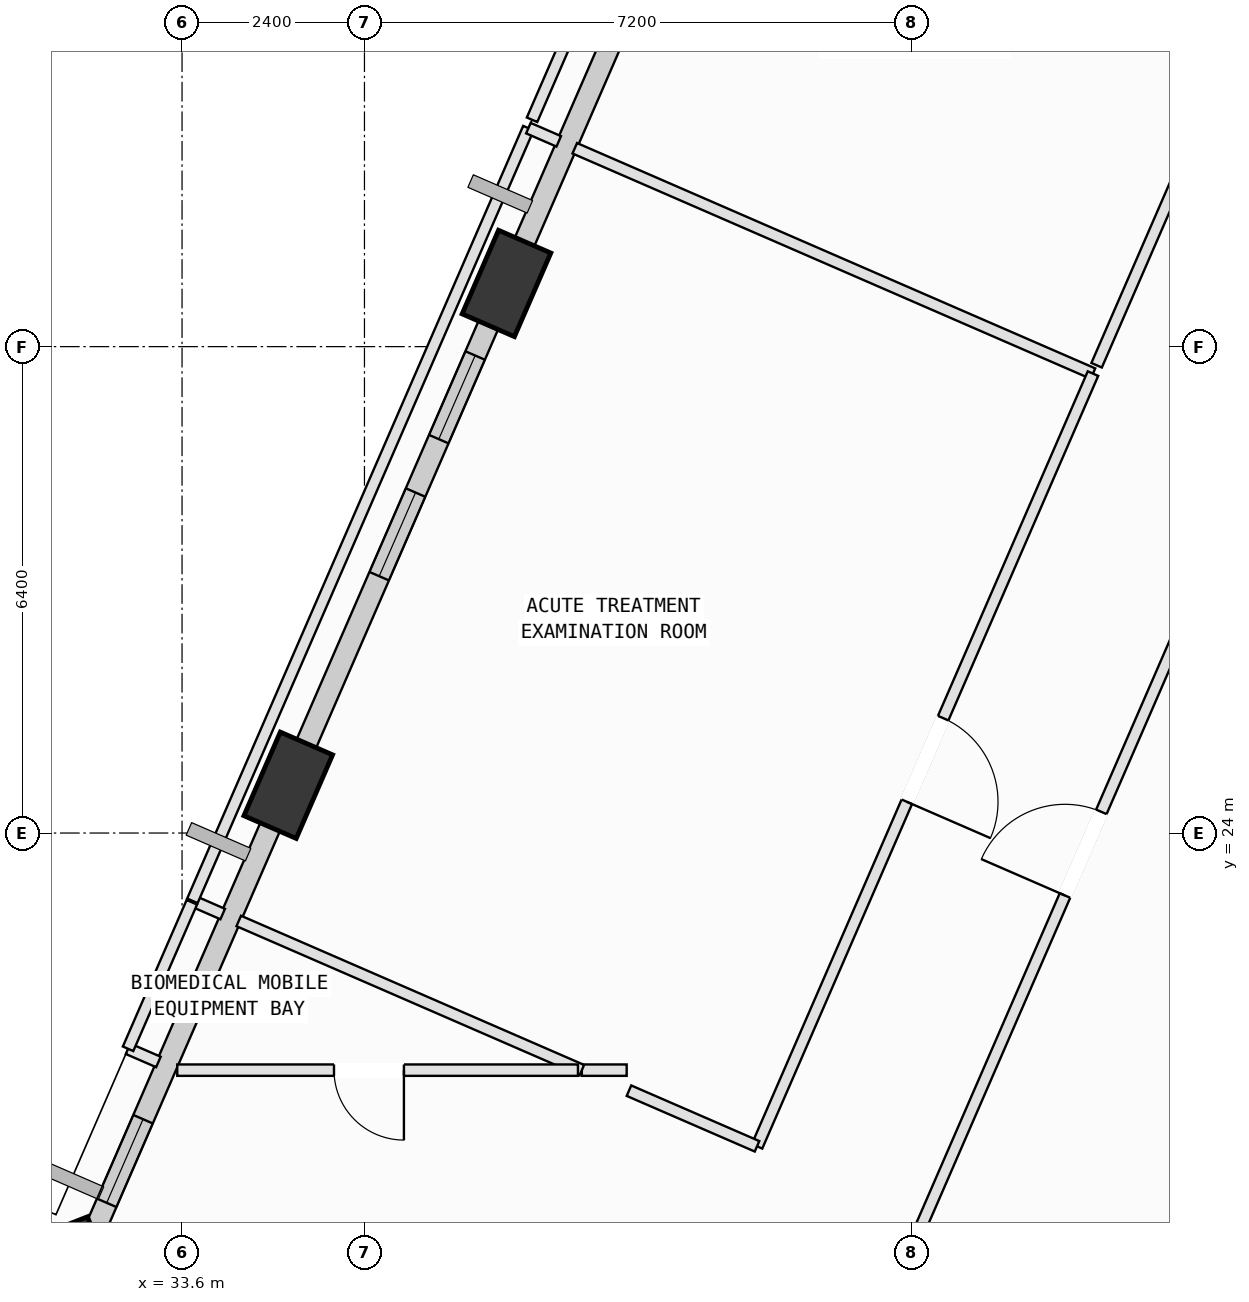
"""IFC4 building model, lengths in metres.
Left out: names, types, materials, properties, quantities, classifications, styles, units other than length and angle.
Written with IfcOpenShell. Run it as: python <this file> out.ifc"""

import sys

from ifc_helpers import new_model, si_unit, direction, frame, frame_2d, origin, origin_2d, place, context, subcontext, project, spatial, rectangle, extrude, element, fill, save


model = new_model("IFC4")
c1 = context("Model", 3, precision=1e-05, world=origin(), true_north=direction((0.0, 1.0)))
c2 = subcontext(c1, "Body", "Model", "MODEL_VIEW")
j1 = project(units=[si_unit("LENGTHUNIT", "METRE"), si_unit("PLANEANGLEUNIT", "RADIAN")], contexts=[c1])
p1 = place(None, origin())
s1 = spatial("IfcSite", under=j1, at=p1, CompositionType="ELEMENT")
p2 = place(p1, origin())
s2 = spatial("IfcBuilding", under=s1, at=p2, CompositionType="ELEMENT")
p3 = place(p2, frame((0.0, 0.0, 308.6)))
s3 = spatial("IfcBuildingStorey", under=s2, at=p3, CompositionType="ELEMENT", Elevation=308.6)
for number, where, z_axis, x_axis in (
    (1, (37.868, 31.231, 0.002), (0.0, 0.0, 1.0), (0.399, 0.917, 0.0)),
    (2, (34.998, 24.628, 0.002), (0.0, 0.0, 1.0), (0.399, 0.917, 0.0)),
    (3, (32.226, 18.255, 0.002), (0.0, 0.0, 1.0), (-0.367, 0.93, 0.0)),
):
    element("IfcColumn", number, at=place(p3, frame(where, z_axis=z_axis, x_axis=x_axis)), inside=s3, PredefinedType="COLUMN", context=c2, shape_type="SweptSolid", body=[
        extrude(rectangle(XDim=1.2, YDim=0.75, at=origin_2d()), origin(), (0.0, 0.0, 1.0), 3.996),
    ])
p4 = place(p3, frame((38.027, 31.596, 0.0), z_axis=(0.0, 0.0, 1.0), x_axis=(0.398764437463, 0.917053391802, 0.0)))
e4 = element("IfcWall", 4, at=p4, inside=s3, PredefinedType="SOLIDWALL", context=c2, shape_type="SweptSolid", body=[
    extrude(rectangle(XDim=6.755, YDim=0.28, at=frame_2d((3.377, 0.0))), origin(), (0.0, 0.0, 1.0), 3.265),
])
p5 = place(p4, frame((3.438, 0.0, 0.75)))
e5 = element("IfcOpeningElement", 5, at=p5, cuts=e4, PredefinedType="OPENING", context=c2, shape_type="SweptSolid", body=[
    extrude(rectangle(XDim=1.8, YDim=2.05, at=frame_2d((0.9, 1.025))), frame((0.0, 0.15, 0.0), z_axis=(0.0, -1.0, 0.0), x_axis=(1.0, 0.0, 0.0)), (0.0, 0.0, 1.0), 0.3),
])
p6 = place(p3, frame((35.156, 24.993, 0.0), z_axis=(0.0, 0.0, 1.0), x_axis=(0.398758169539, 0.917056117272, 0.0)))
e6 = element("IfcWall", 6, at=p6, inside=s3, PredefinedType="SOLIDWALL", context=c2, shape_type="SweptSolid", body=[
    extrude(rectangle(XDim=6.405, YDim=0.28, at=frame_2d((3.202, 0.0))), origin(), (0.0, 0.0, 1.0), 3.265),
])
p7 = place(p6, frame((2.602, 0.0, 0.75)))
e7 = element("IfcOpeningElement", 7, at=p7, cuts=e6, PredefinedType="OPENING", context=c2, shape_type="SweptSolid", body=[
    extrude(rectangle(XDim=1.2, YDim=1.75, at=frame_2d((0.6, 0.875))), frame((0.0, 0.15, 0.0), z_axis=(0.0, -1.0, 0.0), x_axis=(1.0, 0.0, 0.0)), (0.0, 0.0, 1.0), 0.3),
])
p8 = place(p6, frame((4.569, 0.0, 0.75)))
e8 = element("IfcOpeningElement", 8, at=p8, cuts=e6, PredefinedType="OPENING", context=c2, shape_type="SweptSolid", body=[
    extrude(rectangle(XDim=1.2, YDim=1.75, at=frame_2d((0.6, 0.875))), frame((0.0, 0.15, 0.0), z_axis=(0.0, -1.0, 0.0), x_axis=(1.0, 0.0, 0.0)), (0.0, 0.0, 1.0), 0.3),
])
p9 = place(p3, frame((32.385, 18.619, 0.0), z_axis=(0.0, 0.0, 1.0), x_axis=(0.398753668733, 0.917058074318, 0.0)))
e9 = element("IfcWall", 9, at=p9, inside=s3, PredefinedType="SOLIDWALL", context=c2, shape_type="SweptSolid", body=[
    extrude(rectangle(XDim=6.155, YDim=0.28, at=frame_2d((3.078, 0.0))), origin(), (0.0, 0.0, 1.0), 3.265),
])
p10 = place(p9, frame((0.561, 0.0, 0.75)))
e10 = element("IfcOpeningElement", 10, at=p10, cuts=e9, PredefinedType="OPENING", context=c2, shape_type="SweptSolid", body=[
    extrude(rectangle(XDim=1.2, YDim=1.75, at=frame_2d((0.6, 0.875))), frame((0.0, 0.15, 0.0), z_axis=(0.0, -1.0, 0.0), x_axis=(1.0, 0.0, 0.0)), (0.0, 0.0, 1.0), 0.3),
])
p11 = place(p3, frame((25.484, 21.187, 0.0), z_axis=(0.0, 0.0, 1.0), x_axis=(0.917060568388, -0.398747932794, 0.0)))
e11 = element("IfcWall", 11, at=p11, inside=s3, PredefinedType="SOLIDWALL", context=c2, shape_type="SweptSolid", body=[
    extrude(rectangle(XDim=6.955, YDim=0.28, at=frame_2d((3.478, 0.0))), origin(), (0.0, 0.0, 1.0), 2.765),
])
p12 = place(p3, frame((42.856, 17.749, 0.0), z_axis=(0.0, 0.0, 1.0), x_axis=(0.398751440491, 0.917059043195, 0.0)))
e12 = element("IfcWall", 12, at=p12, inside=s3, PredefinedType="PARTITIONING", context=c2, shape_type="SweptSolid", body=[
    extrude(rectangle(XDim=13.041, YDim=0.15, at=frame_2d((6.52, 0.0))), origin(), (0.0, 0.0, 1.0), 3.78),
])
p13 = place(p12, frame((5.92, 0.0, 0.0)))
e13 = element("IfcOpeningElement", 13, at=p13, cuts=e12, PredefinedType="OPENING", context=c2, shape_type="SweptSolid", body=[
    extrude(rectangle(XDim=1.2, YDim=2.15, at=frame_2d((0.6, 1.075))), frame((0.0, 0.085, 0.0), z_axis=(0.0, -1.0, 0.0), x_axis=(1.0, 0.0, 0.0)), (0.0, 0.0, 1.0), 0.17),
])
p14 = place(p3, frame((39.45, 20.88, 0.0), z_axis=(0.0, 0.0, 1.0), x_axis=(-1.0, 0.0, 0.0)))
e14 = element("IfcWall", 14, at=p14, inside=s3, PredefinedType="PARTITIONING", context=c2, shape_type="SweptSolid", body=[
    extrude(rectangle(XDim=0.59, YDim=0.15, at=frame_2d((0.295, 0.0))), origin(), (0.0, 0.0, 1.0), 3.78),
])
p15 = place(p3, frame((38.86, 20.88, 0.0), z_axis=(0.0, 0.0, 1.0), x_axis=(-0.917036147656, 0.39880409212, 0.0)))
e15 = element("IfcWall", 15, at=p15, inside=s3, PredefinedType="PARTITIONING", context=c2, shape_type="SweptSolid", body=[
    extrude(rectangle(XDim=4.923, YDim=0.15, at=frame_2d((2.461, 0.0))), origin(), (0.0, 0.0, 1.0), 3.78),
])
p16 = place(p3, frame((34.135, 22.934, 0.0), z_axis=(0.0, 0.0, 1.0), x_axis=(-0.916748651636, 0.399464528742, 0.0)))
e16 = element("IfcWall", 16, at=p16, inside=s3, PredefinedType="PARTITIONING", context=c2, shape_type="SweptSolid", body=[
    extrude(rectangle(XDim=0.435, YDim=0.15, at=frame_2d((0.218, 0.0))), origin(), (0.0, 0.0, 1.0), 3.78),
])
p17 = place(p3, frame((33.736, 23.108, 0.0), z_axis=(0.0, 0.0, 1.0), x_axis=(0.398761541239, 0.917054651168, 0.0)))
e17 = element("IfcWall", 17, at=p17, inside=s3, PredefinedType="PARTITIONING", context=c2, shape_type="SweptSolid", body=[
    extrude(rectangle(XDim=11.087, YDim=0.15, at=frame_2d((5.543, 0.0))), origin(), (0.0, 0.0, 1.0), 3.78),
])
p18 = place(p3, frame((38.157, 33.275, 0.0), z_axis=(0.0, 0.0, 1.0), x_axis=(0.916748651636, -0.399464528742, 0.0)))
e18 = element("IfcWall", 18, at=p18, inside=s3, PredefinedType="PARTITIONING", context=c2, shape_type="SweptSolid", body=[
    extrude(rectangle(XDim=0.435, YDim=0.15, at=frame_2d((0.218, 0.0))), origin(), (0.0, 0.0, 1.0), 3.78),
])
p19 = place(p3, frame((38.767, 33.01, 0.0), z_axis=(0.0, 0.0, 1.0), x_axis=(0.917030896956, -0.398816165707, 0.0)))
e19 = element("IfcWall", 19, at=p19, inside=s3, PredefinedType="PARTITIONING", context=c2, shape_type="SweptSolid", body=[
    extrude(rectangle(XDim=7.435, YDim=0.15, at=frame_2d((3.717, 0.0))), origin(), (0.0, 0.0, 1.0), 3.78),
])
p20 = place(p3, frame((45.585, 30.045, 0.0), z_axis=(0.0, 0.0, 1.0), x_axis=(-0.398687458661, -0.91708686083, 0.0)))
e20 = element("IfcWall", 20, at=p20, inside=s3, PredefinedType="PARTITIONING", context=c2, shape_type="SweptSolid", body=[
    extrude(rectangle(XDim=11.086, YDim=0.15, at=frame_2d((5.543, 0.0))), origin(), (0.0, 0.0, 1.0), 2.765),
])
p21 = place(p20, frame((4.943, 0.0, 0.0)))
e21 = element("IfcOpeningElement", 21, at=p21, cuts=e20, PredefinedType="OPENING", context=c2, shape_type="SweptSolid", body=[
    extrude(rectangle(XDim=1.2, YDim=2.15, at=frame_2d((0.6, 1.075))), frame((0.0, 0.085, 0.0), z_axis=(0.0, -1.0, 0.0), x_axis=(1.0, 0.0, 0.0)), (0.0, 0.0, 1.0), 0.17),
])
p22 = place(p3, frame((41.165, 19.878, 0.0), z_axis=(0.0, 0.0, 1.0), x_axis=(-0.917160874805, 0.398517163654, 0.0)))
e22 = element("IfcWall", 22, at=p22, inside=s3, PredefinedType="PARTITIONING", context=c2, shape_type="SweptSolid", body=[
    extrude(rectangle(XDim=1.837, YDim=0.15, at=frame_2d((0.918, 0.0))), origin(), (0.0, 0.0, 1.0), 3.78),
])
p23 = place(p3, frame((48.222, 36.108, 0.0), z_axis=(0.0, 0.0, 1.0), x_axis=(-0.398811373886, -0.9170329809, 0.0)))
e23 = element("IfcWall", 23, at=p23, inside=s3, PredefinedType="PARTITIONING", context=c2, shape_type="SweptSolid", body=[
    extrude(rectangle(XDim=6.491, YDim=0.15, at=frame_2d((3.246, 0.0))), origin(), (0.0, 0.0, 1.0), 2.765),
])
p24 = place(p23, frame((2.646, 0.0, 0.0)))
e24 = element("IfcOpeningElement", 24, at=p24, cuts=e23, PredefinedType="OPENING", context=c2, shape_type="SweptSolid", body=[
    extrude(rectangle(XDim=1.2, YDim=2.15, at=frame_2d((0.6, 1.075))), frame((0.0, 0.085, 0.0), z_axis=(0.0, -1.0, 0.0), x_axis=(1.0, 0.0, 0.0)), (0.0, 0.0, 1.0), 0.17),
])
p25 = place(p3, frame((38.205, 33.385, 0.0), z_axis=(0.0, 0.0, 1.0), x_axis=(0.398763364975, 0.917053858153, 0.0)))
e25 = element("IfcWall", 25, at=p25, inside=s3, PredefinedType="PARTITIONING", context=c2, shape_type="SweptSolid", body=[
    extrude(rectangle(XDim=5.991, YDim=0.15, at=frame_2d((2.995, 0.0))), origin(), (0.0, 0.0, 1.0), 3.78),
])
p26 = place(p3, frame((38.809, 20.88, 0.0), z_axis=(0.0, 0.0, 1.0), x_axis=(-1.0, 0.0, 0.0)))
e26 = element("IfcWall", 26, at=p26, inside=s3, PredefinedType="PARTITIONING", context=c2, shape_type="SweptSolid", body=[
    extrude(rectangle(XDim=5.272, YDim=0.15, at=frame_2d((2.636, 0.0))), origin(), (0.0, 0.0, 1.0), 3.78),
])
p27 = place(p26, frame((2.29, 0.0, 0.0)))
e27 = element("IfcOpeningElement", 27, at=p27, cuts=e26, PredefinedType="OPENING", context=c2, shape_type="SweptSolid", body=[
    extrude(rectangle(XDim=0.92, YDim=2.1, at=frame_2d((0.46, 1.05))), frame((0.0, 0.085, 0.0), z_axis=(0.0, -1.0, 0.0), x_axis=(1.0, 0.0, 0.0)), (0.0, 0.0, 1.0), 0.17),
])
p28 = place(p3, frame((33.289, 20.988, 0.0), z_axis=(0.0, 0.0, 1.0), x_axis=(-0.917657976039, 0.397371160267, 0.0)))
e28 = element("IfcWall", 28, at=p28, inside=s3, PredefinedType="PARTITIONING", context=c2, shape_type="SweptSolid", body=[
    extrude(rectangle(XDim=0.435, YDim=0.15, at=frame_2d((0.218, 0.0))), origin(), (0.0, 0.0, 1.0), 3.78),
])
p29 = place(p3, frame((32.89, 21.161, 0.0), z_axis=(0.0, 0.0, 1.0), x_axis=(0.399027500697, 0.91693895854, 0.0)))
e29 = element("IfcWall", 29, at=p29, inside=s3, PredefinedType="PARTITIONING", context=c2, shape_type="SweptSolid", body=[
    extrude(rectangle(XDim=2.103, YDim=0.15, at=frame_2d((1.051, 0.0))), origin(), (0.0, 0.0, 1.0), 3.78),
])
p30 = place(p7, origin())
e30 = element("IfcWindow", 30, at=p30, inside=s3, PartitioningType="SINGLE_PANEL", PredefinedType="WINDOW", context=c2, shape_type="SweptSolid", body=[
    extrude(rectangle(XDim=1.2, YDim=1.75, at=frame_2d((0.6, 0.875))), frame((0.0, 0.03, 0.0), z_axis=(0.0, -1.0, 0.0), x_axis=(1.0, 0.0, 0.0)), (0.0, 0.0, 1.0), 0.06),
])
fill(e7, e30)
p31 = place(p8, origin())
e31 = element("IfcWindow", 31, at=p31, inside=s3, PartitioningType="SINGLE_PANEL", PredefinedType="WINDOW", context=c2, shape_type="SweptSolid", body=[
    extrude(rectangle(XDim=1.2, YDim=1.75, at=frame_2d((0.6, 0.875))), frame((0.0, 0.03, 0.0), z_axis=(0.0, -1.0, 0.0), x_axis=(1.0, 0.0, 0.0)), (0.0, 0.0, 1.0), 0.06),
])
fill(e8, e31)
p32 = place(p10, origin())
e32 = element("IfcWindow", 32, at=p32, inside=s3, PartitioningType="SINGLE_PANEL", PredefinedType="WINDOW", context=c2, shape_type="SweptSolid", body=[
    extrude(rectangle(XDim=1.2, YDim=1.75, at=frame_2d((0.6, 0.875))), frame((0.0, 0.03, 0.0), z_axis=(0.0, -1.0, 0.0), x_axis=(1.0, 0.0, 0.0)), (0.0, 0.0, 1.0), 0.06),
])
fill(e10, e32)
p33 = place(p13, origin())
e33 = element("IfcDoor", 33, at=p33, inside=s3, OperationType="SINGLE_SWING_LEFT", PredefinedType="DOOR", context=c2, shape_type="SweptSolid", body=[
    extrude(rectangle(XDim=1.2, YDim=2.15, at=frame_2d((0.6, 1.075))), frame((0.0, 0.025, 0.0), z_axis=(0.0, -1.0, 0.0), x_axis=(1.0, 0.0, 0.0)), (0.0, 0.0, 1.0), 0.05),
])
fill(e13, e33)
p34 = place(p21, origin())
e34 = element("IfcDoor", 34, at=p34, inside=s3, OperationType="SINGLE_SWING_RIGHT", PredefinedType="DOOR", context=c2, shape_type="SweptSolid", body=[
    extrude(rectangle(XDim=1.2, YDim=2.15, at=frame_2d((0.6, 1.075))), frame((0.0, 0.025, 0.0), z_axis=(0.0, -1.0, 0.0), x_axis=(1.0, 0.0, 0.0)), (0.0, 0.0, 1.0), 0.05),
])
fill(e21, e34)
p35 = place(p27, origin())
e35 = element("IfcDoor", 35, at=p35, inside=s3, OperationType="SINGLE_SWING_LEFT", PredefinedType="DOOR", context=c2, shape_type="SweptSolid", body=[
    extrude(rectangle(XDim=0.92, YDim=2.1, at=frame_2d((0.46, 1.05))), frame((0.0, 0.025, 0.0), z_axis=(0.0, -1.0, 0.0), x_axis=(1.0, 0.0, 0.0)), (0.0, 0.0, 1.0), 0.05),
])
fill(e27, e35)
save(model, sys.argv[1])
